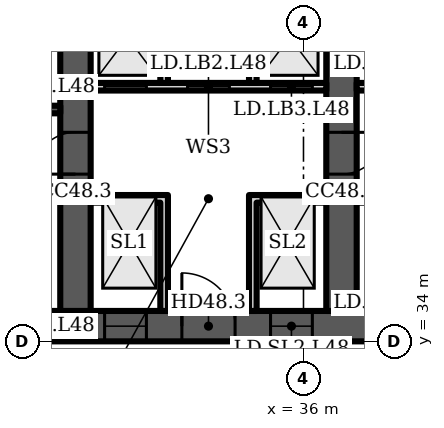
"""IFC4 building model, lengths in metres.
Left out: names, types, materials, properties, quantities, classifications, styles, units other than length and angle.
Written with IfcOpenShell. Run it as: python <this file> out.ifc"""

import sys

from ifc_helpers import new_model, si_unit, direction, frame, frame_2d, origin, place, context, subcontext, project, spatial, polyline, rectangle, outline, extrude, element, fill, save


model = new_model("IFC4")
c1 = context("Model", 3, precision=1e-05, world=origin(), true_north=direction((0.0, 1.0)))
c2 = subcontext(c1, "Body", "Model", "MODEL_VIEW")
j1 = project(units=[si_unit("LENGTHUNIT", "METRE"), si_unit("PLANEANGLEUNIT", "RADIAN")], contexts=[c1])
p1 = place(None, origin())
s1 = spatial("IfcSite", under=j1, at=p1, CompositionType="ELEMENT")
p2 = place(p1, origin())
s2 = spatial("IfcBuilding", under=s1, at=p2, CompositionType="ELEMENT")
p3 = place(p2, frame((0.0, 0.0, 195.1)))
s3 = spatial("IfcBuildingStorey", under=s2, at=p3, CompositionType="ELEMENT", Elevation=195.1)
p4 = place(p3, frame((16.0, 34.4, 0.0), z_axis=(0.0, 0.0, 1.0), x_axis=(1.0, 0.0, 0.0)))
e1 = element("IfcWall", 1, at=p4, inside=s3, PredefinedType="SHEAR", context=c2, shape_type="SweptSolid", body=[
    extrude(rectangle(XDim=42.0, YDim=0.8, at=frame_2d((21.0, 0.0))), origin(), (0.0, 0.0, 1.0), 3.6),
])
p5 = place(p4, frame((3.2, 0.0, 0.0)))
e2 = element("IfcOpeningElement", 2, at=p5, cuts=e1, PredefinedType="OPENING", context=c2, shape_type="SweptSolid", body=[
    extrude(rectangle(XDim=1.0, YDim=2.1, at=frame_2d((0.5, 1.05))), frame((0.0, 0.41, 0.0), z_axis=(0.0, -1.0, 0.0), x_axis=(1.0, 0.0, 0.0)), (0.0, 0.0, 1.0), 0.82),
])
p6 = place(p4, frame((7.65, 0.0, 0.0)))
e3 = element("IfcOpeningElement", 3, at=p6, cuts=e1, PredefinedType="OPENING", context=c2, shape_type="SweptSolid", body=[
    extrude(rectangle(XDim=1.2, YDim=2.1, at=frame_2d((0.6, 1.05))), frame((0.0, 0.41, 0.0), z_axis=(0.0, -1.0, 0.0), x_axis=(1.0, 0.0, 0.0)), (0.0, 0.0, 1.0), 0.82),
])
p7 = place(p4, frame((14.767, 0.0, 0.0)))
e4 = element("IfcOpeningElement", 4, at=p7, cuts=e1, PredefinedType="OPENING", context=c2, shape_type="SweptSolid", body=[
    extrude(rectangle(XDim=1.1, YDim=2.1, at=frame_2d((0.55, 1.05))), frame((0.0, 0.41, 0.0), z_axis=(0.0, -1.0, 0.0), x_axis=(1.0, 0.0, 0.0)), (0.0, 0.0, 1.0), 0.82),
])
p8 = place(p4, frame((19.133, 0.0, 0.0)))
e5 = element("IfcOpeningElement", 5, at=p8, cuts=e1, PredefinedType="OPENING", context=c2, shape_type="SweptSolid", body=[
    extrude(rectangle(XDim=1.1, YDim=2.1, at=frame_2d((0.55, 1.05))), frame((0.0, 0.41, 0.0), z_axis=(0.0, -1.0, 0.0), x_axis=(1.0, 0.0, 0.0)), (0.0, 0.0, 1.0), 0.82),
])
p9 = place(p4, frame((16.8, 0.0, 0.0)))
e6 = element("IfcOpeningElement", 6, at=p9, cuts=e1, PredefinedType="OPENING", context=c2, shape_type="SweptSolid", body=[
    extrude(rectangle(XDim=1.4, YDim=2.1, at=frame_2d((0.7, 1.05))), frame((0.0, 0.41, 0.0), z_axis=(0.0, -1.0, 0.0), x_axis=(1.0, 0.0, 0.0)), (0.0, 0.0, 1.0), 0.82),
])
p10 = place(p4, frame((21.767, 0.0, 0.0)))
e7 = element("IfcOpeningElement", 7, at=p10, cuts=e1, PredefinedType="OPENING", context=c2, shape_type="SweptSolid", body=[
    extrude(rectangle(XDim=1.1, YDim=2.1, at=frame_2d((0.55, 1.05))), frame((0.0, 0.41, 0.0), z_axis=(0.0, -1.0, 0.0), x_axis=(1.0, 0.0, 0.0)), (0.0, 0.0, 1.0), 0.82),
])
p11 = place(p4, frame((23.95, 0.0, 0.0)))
e8 = element("IfcOpeningElement", 8, at=p11, cuts=e1, PredefinedType="OPENING", context=c2, shape_type="SweptSolid", body=[
    extrude(rectangle(XDim=1.1, YDim=2.1, at=frame_2d((0.55, 1.05))), frame((0.0, 0.41, 0.0), z_axis=(0.0, -1.0, 0.0), x_axis=(1.0, 0.0, 0.0)), (0.0, 0.0, 1.0), 0.82),
])
p12 = place(p4, frame((26.133, 0.0, 0.0)))
e9 = element("IfcOpeningElement", 9, at=p12, cuts=e1, PredefinedType="OPENING", context=c2, shape_type="SweptSolid", body=[
    extrude(rectangle(XDim=1.1, YDim=2.1, at=frame_2d((0.55, 1.05))), frame((0.0, 0.41, 0.0), z_axis=(0.0, -1.0, 0.0), x_axis=(1.0, 0.0, 0.0)), (0.0, 0.0, 1.0), 0.82),
])
p13 = place(p4, frame((33.15, 0.0, 0.0)))
e10 = element("IfcOpeningElement", 10, at=p13, cuts=e1, PredefinedType="OPENING", context=c2, shape_type="SweptSolid", body=[
    extrude(rectangle(XDim=1.2, YDim=2.1, at=frame_2d((0.6, 1.05))), frame((0.0, 0.41, 0.0), z_axis=(0.0, -1.0, 0.0), x_axis=(1.0, 0.0, 0.0)), (0.0, 0.0, 1.0), 0.82),
])
p14 = place(p4, frame((35.817, 0.0, 0.0)))
e11 = element("IfcOpeningElement", 11, at=p14, cuts=e1, PredefinedType="OPENING", context=c2, shape_type="SweptSolid", body=[
    extrude(rectangle(XDim=1.0, YDim=2.1, at=frame_2d((0.5, 1.05))), frame((0.0, 0.41, 0.0), z_axis=(0.0, -1.0, 0.0), x_axis=(1.0, 0.0, 0.0)), (0.0, 0.0, 1.0), 0.82),
])
p15 = place(p4, frame((39.95, 0.0, 0.0)))
e12 = element("IfcOpeningElement", 12, at=p15, cuts=e1, PredefinedType="OPENING", context=c2, shape_type="SweptSolid", body=[
    extrude(rectangle(XDim=1.0, YDim=2.1, at=frame_2d((0.5, 1.05))), frame((0.0, 0.41, 0.0), z_axis=(0.0, -1.0, 0.0), x_axis=(1.0, 0.0, 0.0)), (0.0, 0.0, 1.0), 0.82),
])
p16 = place(p4, frame((37.767, 0.0, 0.0)))
e13 = element("IfcOpeningElement", 13, at=p16, cuts=e1, PredefinedType="OPENING", context=c2, shape_type="SweptSolid", body=[
    extrude(rectangle(XDim=1.4, YDim=2.1, at=frame_2d((0.7, 1.05))), frame((0.0, 0.41, 0.0), z_axis=(0.0, -1.0, 0.0), x_axis=(1.0, 0.0, 0.0)), (0.0, 0.0, 1.0), 0.82),
])
p17 = place(p3, frame((30.0, 34.8, 0.0), z_axis=(0.0, 0.0, 1.0), x_axis=(0.0, 1.0, 0.0)))
e14 = element("IfcWall", 14, at=p17, inside=s3, PredefinedType="SHEAR", context=c2, shape_type="SweptSolid", body=[
    extrude(rectangle(XDim=14.374, YDim=0.8, at=frame_2d((7.187, 0.0))), origin(), (0.0, 0.0, 1.0), 3.6),
])
p18 = place(p17, frame((3.6, 0.0, 0.0)))
e15 = element("IfcOpeningElement", 15, at=p18, cuts=e14, PredefinedType="OPENING", context=c2, shape_type="SweptSolid", body=[
    extrude(rectangle(XDim=1.1, YDim=2.1, at=frame_2d((0.55, 1.05))), frame((0.0, 0.41, 0.0), z_axis=(0.0, -1.0, 0.0), x_axis=(1.0, 0.0, 0.0)), (0.0, 0.0, 1.0), 0.82),
])
p19 = place(p3, frame((37.0, 34.8, 0.0), z_axis=(0.0, 0.0, 1.0), x_axis=(0.0, 1.0, 0.0)))
e16 = element("IfcWall", 16, at=p19, inside=s3, PredefinedType="SHEAR", context=c2, shape_type="SweptSolid", body=[
    extrude(rectangle(XDim=14.987, YDim=0.8, at=frame_2d((7.493, 0.0))), origin(), (0.0, 0.0, 1.0), 3.6),
])
p20 = place(p19, frame((11.312, 0.0, 0.0)))
e17 = element("IfcOpeningElement", 17, at=p20, cuts=e16, PredefinedType="OPENING", context=c2, shape_type="SweptSolid", body=[
    extrude(rectangle(XDim=1.0, YDim=2.1, at=frame_2d((0.5, 1.05))), frame((0.0, 0.41, 0.0), z_axis=(0.0, -1.0, 0.0), x_axis=(1.0, 0.0, 0.0)), (0.0, 0.0, 1.0), 0.82),
])
p21 = place(p19, frame((3.6, 0.0, 0.0)))
e18 = element("IfcOpeningElement", 18, at=p21, cuts=e16, PredefinedType="OPENING", context=c2, shape_type="SweptSolid", body=[
    extrude(rectangle(XDim=1.1, YDim=2.1, at=frame_2d((0.55, 1.05))), frame((0.0, 0.41, 0.0), z_axis=(0.0, -1.0, 0.0), x_axis=(1.0, 0.0, 0.0)), (0.0, 0.0, 1.0), 0.82),
])
p22 = place(p3, frame((23.4, 40.1, 0.0), z_axis=(0.0, 0.0, 1.0), x_axis=(1.0, 0.0, 0.0)))
e19 = element("IfcWall", 19, at=p22, inside=s3, PredefinedType="SHEAR", context=c2, shape_type="SweptSolid", body=[
    extrude(rectangle(XDim=6.2, YDim=0.2, at=frame_2d((3.1, 0.0))), origin(), (0.0, 0.0, 1.0), 3.2),
])
p23 = place(p22, frame((3.525, 0.0, 0.0)))
e20 = element("IfcOpeningElement", 20, at=p23, cuts=e19, PredefinedType="OPENING", context=c2, shape_type="SweptSolid", body=[
    extrude(rectangle(XDim=1.2, YDim=2.1, at=frame_2d((0.6, 1.05))), frame((0.0, 0.11, 0.0), z_axis=(0.0, -1.0, 0.0), x_axis=(1.0, 0.0, 0.0)), (0.0, 0.0, 1.0), 0.22),
])
p24 = place(p22, frame((0.575, 0.0, 0.0)))
e21 = element("IfcOpeningElement", 21, at=p24, cuts=e19, PredefinedType="OPENING", context=c2, shape_type="SweptSolid", body=[
    extrude(rectangle(XDim=0.9, YDim=2.1, at=frame_2d((0.45, 1.05))), frame((0.0, 0.11, 0.0), z_axis=(0.0, -1.0, 0.0), x_axis=(1.0, 0.0, 0.0)), (0.0, 0.0, 1.0), 0.22),
])
p25 = place(p3, frame((30.4, 40.7, 0.0), z_axis=(0.0, 0.0, 1.0), x_axis=(1.0, 0.0, 0.0)))
e22 = element("IfcWall", 22, at=p25, inside=s3, PredefinedType="PARTITIONING", context=c2, shape_type="SweptSolid", body=[
    extrude(rectangle(XDim=6.2, YDim=0.2, at=frame_2d((3.1, 0.0))), origin(), (0.0, 0.0, 1.0), 3.2),
])
p26 = place(p25, frame((0.367, 0.0, 0.0)))
e23 = element("IfcOpeningElement", 23, at=p26, cuts=e22, PredefinedType="OPENING", context=c2, shape_type="SweptSolid", body=[
    extrude(rectangle(XDim=1.1, YDim=2.1, at=frame_2d((0.55, 1.05))), frame((0.0, 0.11, 0.0), z_axis=(0.0, -1.0, 0.0), x_axis=(1.0, 0.0, 0.0)), (0.0, 0.0, 1.0), 0.22),
])
p27 = place(p25, frame((2.55, 0.0, 0.0)))
e24 = element("IfcOpeningElement", 24, at=p27, cuts=e22, PredefinedType="OPENING", context=c2, shape_type="SweptSolid", body=[
    extrude(rectangle(XDim=1.1, YDim=2.1, at=frame_2d((0.55, 1.05))), frame((0.0, 0.11, 0.0), z_axis=(0.0, -1.0, 0.0), x_axis=(1.0, 0.0, 0.0)), (0.0, 0.0, 1.0), 0.22),
])
p28 = place(p25, frame((4.733, 0.0, 0.0)))
e25 = element("IfcOpeningElement", 25, at=p28, cuts=e22, PredefinedType="OPENING", context=c2, shape_type="SweptSolid", body=[
    extrude(rectangle(XDim=1.1, YDim=2.1, at=frame_2d((0.55, 1.05))), frame((0.0, 0.11, 0.0), z_axis=(0.0, -1.0, 0.0), x_axis=(1.0, 0.0, 0.0)), (0.0, 0.0, 1.0), 0.22),
])
p29 = place(p3, frame((0.0, 0.0, -0.0)))
e26 = element("IfcWall", 26, at=p29, inside=s3, PredefinedType="PARTITIONING", context=c2, shape_type="SweptSolid", body=[
    extrude(outline(polyline([(32.233, 37.65), (30.4, 37.65), (30.4, 37.85), (32.233, 37.85), (32.433, 37.85), (32.433, 34.8), (32.233, 34.8), (32.233, 37.65)])), origin(), (0.0, 0.0, 1.0), 3.2),
])
p30 = place(p3, frame((0.0, 0.0, -0.0)))
e27 = element("IfcWall", 27, at=p30, inside=s3, PredefinedType="PARTITIONING", context=c2, shape_type="SweptSolid", body=[
    extrude(outline(polyline([(34.567, 37.85), (34.767, 37.85), (36.6, 37.85), (36.6, 37.65), (34.767, 37.65), (34.767, 34.8), (34.567, 34.8), (34.567, 37.85)])), origin(), (0.0, 0.0, 1.0), 3.2),
])
p31 = place(p3, frame((0.0, 0.0, -0.0)))
e28 = element("IfcWall", 28, at=p31, inside=s3, PredefinedType="PARTITIONING", context=c2, shape_type="SweptSolid", body=[
    extrude(outline(polyline([(32.433, 40.8), (32.233, 40.8), (32.233, 43.8), (30.4, 43.8), (30.4, 44.0), (36.6, 44.0), (36.6, 43.8), (34.767, 43.8), (34.767, 40.8), (34.567, 40.8), (34.567, 43.8), (32.433, 43.8), (32.433, 40.8)])), origin(), (0.0, 0.0, 1.0), 3.2),
])
p32 = place(p3, frame((37.4, 40.7, 0.0), z_axis=(0.0, 0.0, 1.0), x_axis=(1.0, 0.0, 0.0)))
e29 = element("IfcWall", 29, at=p32, inside=s3, PredefinedType="PARTITIONING", context=c2, shape_type="SweptSolid", body=[
    extrude(rectangle(XDim=6.2, YDim=0.2, at=frame_2d((3.1, 0.0))), origin(), (0.0, 0.0, 1.0), 3.2),
])
p33 = place(p32, frame((0.367, 0.0, 0.0)))
e30 = element("IfcOpeningElement", 30, at=p33, cuts=e29, PredefinedType="OPENING", context=c2, shape_type="SweptSolid", body=[
    extrude(rectangle(XDim=1.1, YDim=2.1, at=frame_2d((0.55, 1.05))), frame((0.0, 0.11, 0.0), z_axis=(0.0, -1.0, 0.0), x_axis=(1.0, 0.0, 0.0)), (0.0, 0.0, 1.0), 0.22),
])
p34 = place(p32, frame((2.55, 0.0, 0.0)))
e31 = element("IfcOpeningElement", 31, at=p34, cuts=e29, PredefinedType="OPENING", context=c2, shape_type="SweptSolid", body=[
    extrude(rectangle(XDim=1.1, YDim=2.1, at=frame_2d((0.55, 1.05))), frame((0.0, 0.11, 0.0), z_axis=(0.0, -1.0, 0.0), x_axis=(1.0, 0.0, 0.0)), (0.0, 0.0, 1.0), 0.22),
])
p35 = place(p32, frame((4.733, 0.0, 0.0)))
e32 = element("IfcOpeningElement", 32, at=p35, cuts=e29, PredefinedType="OPENING", context=c2, shape_type="SweptSolid", body=[
    extrude(rectangle(XDim=1.1, YDim=2.1, at=frame_2d((0.55, 1.05))), frame((0.0, 0.11, 0.0), z_axis=(0.0, -1.0, 0.0), x_axis=(1.0, 0.0, 0.0)), (0.0, 0.0, 1.0), 0.22),
])
p36 = place(p3, frame((0.0, 0.0, -0.0)))
e33 = element("IfcWall", 33, at=p36, inside=s3, PredefinedType="PARTITIONING", context=c2, shape_type="SweptSolid", body=[
    extrude(outline(polyline([(41.567, 37.1), (39.433, 37.1), (39.433, 34.8), (39.233, 34.8), (39.233, 37.65), (37.4, 37.65), (37.4, 37.85), (39.233, 37.85), (39.433, 37.85), (39.433, 37.3), (41.567, 37.3), (41.567, 37.55), (41.767, 37.55), (43.6, 37.55), (43.6, 37.35), (41.767, 37.35), (41.767, 34.8), (41.567, 34.8), (41.567, 37.1)])), origin(), (0.0, 0.0, 1.0), 3.2),
])
p37 = place(p3, frame((0.0, 0.0, -0.0)))
e34 = element("IfcWall", 34, at=p37, inside=s3, PredefinedType="PARTITIONING", context=c2, shape_type="SweptSolid", body=[
    extrude(outline(polyline([(39.433, 40.8), (39.233, 40.8), (39.233, 43.8), (37.4, 43.8), (37.4, 44.0), (43.6, 44.0), (43.6, 43.8), (41.767, 43.8), (41.767, 40.8), (41.567, 40.8), (41.567, 43.8), (39.433, 43.8), (39.433, 40.8)])), origin(), (0.0, 0.0, 1.0), 3.2),
])
p38 = place(p3, frame((37.0, 30.5, 0.0), z_axis=(0.0, 0.0, 1.0), x_axis=(0.0, 1.0, 0.0)))
e35 = element("IfcWall", 35, at=p38, inside=s3, PredefinedType="PARTITIONING", context=c2, shape_type="SweptSolid", body=[
    extrude(rectangle(XDim=3.5, YDim=0.2, at=frame_2d((1.75, 0.0))), origin(), (0.0, 0.0, 1.0), 3.2),
])
p39 = place(p38, frame((1.2, 0.0, 0.0)))
e36 = element("IfcOpeningElement", 36, at=p39, cuts=e35, PredefinedType="OPENING", context=c2, shape_type="SweptSolid", body=[
    extrude(rectangle(XDim=1.1, YDim=2.1, at=frame_2d((0.55, 1.05))), frame((0.0, 0.11, 0.0), z_axis=(0.0, -1.0, 0.0), x_axis=(1.0, 0.0, 0.0)), (0.0, 0.0, 1.0), 0.22),
])
p40 = place(p7, origin())
e37 = element("IfcDoor", 37, at=p40, inside=s3, OperationType="DOUBLE_DOOR_SLIDING", PredefinedType="DOOR", context=c2, shape_type="SweptSolid", body=[
    extrude(rectangle(XDim=1.1, YDim=2.1, at=frame_2d((0.55, 1.05))), frame((0.0, 0.025, 0.0), z_axis=(0.0, -1.0, 0.0), x_axis=(1.0, 0.0, 0.0)), (0.0, 0.0, 1.0), 0.05),
])
fill(e4, e37)
p41 = place(p8, origin())
e38 = element("IfcDoor", 38, at=p41, inside=s3, OperationType="DOUBLE_DOOR_SLIDING", PredefinedType="DOOR", context=c2, shape_type="SweptSolid", body=[
    extrude(rectangle(XDim=1.1, YDim=2.1, at=frame_2d((0.55, 1.05))), frame((0.0, 0.025, 0.0), z_axis=(0.0, -1.0, 0.0), x_axis=(1.0, 0.0, 0.0)), (0.0, 0.0, 1.0), 0.05),
])
fill(e5, e38)
p42 = place(p9, origin())
e39 = element("IfcDoor", 39, at=p42, inside=s3, OperationType="DOUBLE_DOOR_SINGLE_SWING", PredefinedType="DOOR", context=c2, shape_type="SweptSolid", body=[
    extrude(rectangle(XDim=1.4, YDim=2.1, at=frame_2d((0.7, 1.05))), frame((0.0, 0.025, 0.0), z_axis=(0.0, -1.0, 0.0), x_axis=(1.0, 0.0, 0.0)), (0.0, 0.0, 1.0), 0.05),
])
fill(e6, e39)
p43 = place(p26, origin())
e40 = element("IfcDoor", 40, at=p43, inside=s3, OperationType="DOUBLE_DOOR_SLIDING", PredefinedType="DOOR", context=c2, shape_type="SweptSolid", body=[
    extrude(rectangle(XDim=1.1, YDim=2.1, at=frame_2d((0.55, 1.05))), frame((0.0, 0.025, 0.0), z_axis=(0.0, -1.0, 0.0), x_axis=(1.0, 0.0, 0.0)), (0.0, 0.0, 1.0), 0.05),
])
fill(e23, e40)
p44 = place(p27, origin())
e41 = element("IfcDoor", 41, at=p44, inside=s3, OperationType="DOUBLE_DOOR_SLIDING", PredefinedType="DOOR", context=c2, shape_type="SweptSolid", body=[
    extrude(rectangle(XDim=1.1, YDim=2.1, at=frame_2d((0.55, 1.05))), frame((0.0, 0.025, 0.0), z_axis=(0.0, -1.0, 0.0), x_axis=(1.0, 0.0, 0.0)), (0.0, 0.0, 1.0), 0.05),
])
fill(e24, e41)
p45 = place(p28, origin())
e42 = element("IfcDoor", 42, at=p45, inside=s3, OperationType="DOUBLE_DOOR_SLIDING", PredefinedType="DOOR", context=c2, shape_type="SweptSolid", body=[
    extrude(rectangle(XDim=1.1, YDim=2.1, at=frame_2d((0.55, 1.05))), frame((0.0, 0.025, 0.0), z_axis=(0.0, -1.0, 0.0), x_axis=(1.0, 0.0, 0.0)), (0.0, 0.0, 1.0), 0.05),
])
fill(e25, e42)
p46 = place(p18, origin())
e43 = element("IfcDoor", 43, at=p46, inside=s3, OperationType="SINGLE_SWING_LEFT", PredefinedType="DOOR", context=c2, shape_type="SweptSolid", body=[
    extrude(rectangle(XDim=1.1, YDim=2.1, at=frame_2d((0.55, 1.05))), frame((0.0, 0.025, 0.0), z_axis=(0.0, -1.0, 0.0), x_axis=(1.0, 0.0, 0.0)), (0.0, 0.0, 1.0), 0.05),
])
fill(e15, e43)
p47 = place(p21, origin())
e44 = element("IfcDoor", 44, at=p47, inside=s3, OperationType="SINGLE_SWING_RIGHT", PredefinedType="DOOR", context=c2, shape_type="SweptSolid", body=[
    extrude(rectangle(XDim=1.1, YDim=2.1, at=frame_2d((0.55, 1.05))), frame((0.0, 0.025, 0.0), z_axis=(0.0, -1.0, 0.0), x_axis=(1.0, 0.0, 0.0)), (0.0, 0.0, 1.0), 0.05),
])
fill(e18, e44)
save(model, sys.argv[1])
